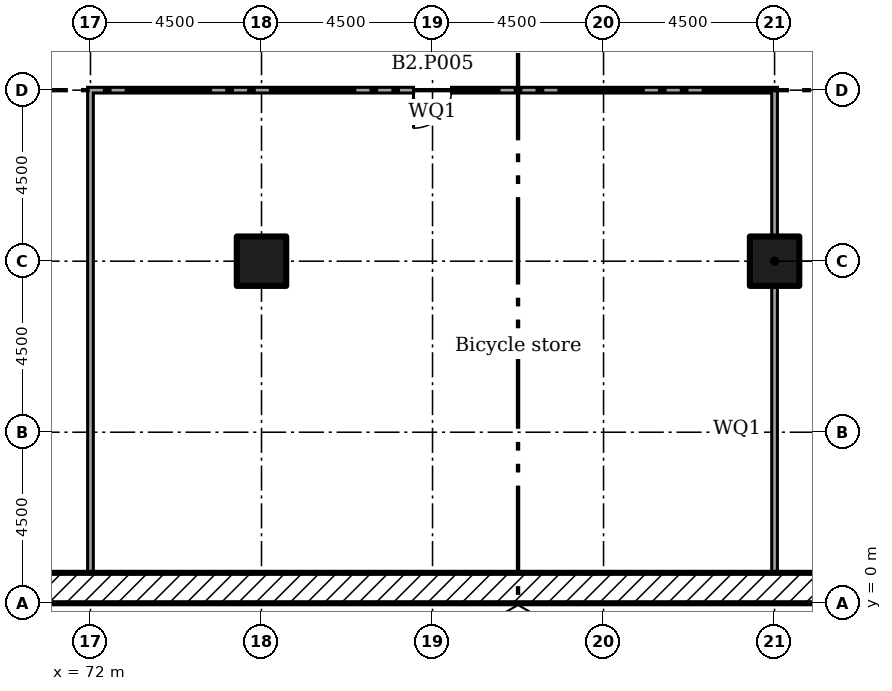
"""IFC4 building model, lengths in metres.
Left out: names, types, materials, properties, quantities, classifications, styles, units other than length and angle.
Written with IfcOpenShell. Run it as: python <this file> out.ifc"""

import sys

from ifc_helpers import new_model, si_unit, direction, frame, frame_2d, origin, origin_2d, place, context, subcontext, project, spatial, rectangle, extrude, element, fill, save


model = new_model("IFC4")
c1 = context("Model", 3, precision=1e-05, world=origin(), true_north=direction((0.0, 1.0)))
c2 = subcontext(c1, "Body", "Model", "MODEL_VIEW")
j1 = project(units=[si_unit("LENGTHUNIT", "METRE"), si_unit("PLANEANGLEUNIT", "RADIAN")], contexts=[c1])
p1 = place(None, origin())
s1 = spatial("IfcSite", under=j1, at=p1, CompositionType="ELEMENT")
p2 = place(p1, origin())
s2 = spatial("IfcBuilding", under=s1, at=p2, CompositionType="ELEMENT")
p3 = place(p2, frame((0.0, 0.0, -8.0)))
s3 = spatial("IfcBuildingStorey", under=s2, at=p3, CompositionType="ELEMENT", Elevation=-8.0)
for number, where in (
    (1, (76.5, 9.0, 0.0)),
    (2, (90.0, 9.0, 0.0)),
):
    element("IfcColumn", number, at=place(p3, frame(where)), inside=s3, PredefinedType="COLUMN", context=c2, shape_type="SweptSolid", body=[
        extrude(rectangle(XDim=1.3, YDim=1.3, at=origin_2d()), origin(), (0.0, 0.0, 1.0), 4.0),
    ])
p4 = place(p3, frame((0.0, 0.4, 0.0)))
e3 = element("IfcWall", 3, at=p4, inside=s3, PredefinedType="SOLIDWALL", context=c2, shape_type="SweptSolid", body=[
    extrude(rectangle(XDim=153.0, YDim=0.8, at=frame_2d((76.5, 0.0))), origin(), (0.0, 0.0, 1.0), 4.0),
])
p5 = place(p3, frame((72.0, 0.8, 0.0), z_axis=(0.0, 0.0, 1.0), x_axis=(0.0, 1.0, 0.0)))
e4 = element("IfcWall", 4, at=p5, inside=s3, PredefinedType="PARTITIONING", context=c2, shape_type="SweptSolid", body=[
    extrude(rectangle(XDim=12.775, YDim=0.15, at=frame_2d((6.387, 0.0))), origin(), (0.0, 0.0, 1.0), 3.55),
])
p6 = place(p3, frame((90.0, 0.8, 0.0), z_axis=(0.0, 0.0, 1.0), x_axis=(0.0, 1.0, 0.0)))
e5 = element("IfcWall", 5, at=p6, inside=s3, PredefinedType="PARTITIONING", context=c2, shape_type="SweptSolid", body=[
    extrude(rectangle(XDim=7.555, YDim=0.15, at=frame_2d((3.777, 0.0))), origin(), (0.0, 0.0, 1.0), 3.55),
])
p7 = place(p3, frame((90.0, 9.645, 0.0), z_axis=(0.0, 0.0, 1.0), x_axis=(0.0, 1.0, 0.0)))
e6 = element("IfcWall", 6, at=p7, inside=s3, PredefinedType="PARTITIONING", context=c2, shape_type="SweptSolid", body=[
    extrude(rectangle(XDim=3.93, YDim=0.15, at=frame_2d((1.965, 0.0))), origin(), (0.0, 0.0, 1.0), 3.55),
])
p8 = place(p3, frame((72.075, 13.5, 0.0)))
e7 = element("IfcWall", 7, at=p8, inside=s3, PredefinedType="PARTITIONING", context=c2, shape_type="SweptSolid", body=[
    extrude(rectangle(XDim=17.85, YDim=0.15, at=frame_2d((8.925, 0.0))), origin(), (0.0, 0.0, 1.0), 3.55),
])
p9 = place(p8, frame((8.425, 0.0, 0.0)))
e8 = element("IfcOpeningElement", 8, at=p9, cuts=e7, PredefinedType="OPENING", context=c2, shape_type="SweptSolid", body=[
    extrude(rectangle(XDim=1.0, YDim=2.1, at=frame_2d((0.5, 1.05))), frame((0.0, 0.085, 0.0), z_axis=(0.0, -1.0, 0.0), x_axis=(1.0, 0.0, 0.0)), (0.0, 0.0, 1.0), 0.17),
])
p10 = place(p9, frame((1.0, 0.0, 0.0), x_axis=(-1.0, 0.0, 0.0)))
e9 = element("IfcDoor", 9, at=p10, inside=s3, OperationType="SINGLE_SWING_LEFT", PredefinedType="DOOR", context=c2, shape_type="SweptSolid", body=[
    extrude(rectangle(XDim=1.0, YDim=2.1, at=frame_2d((0.5, 1.05))), frame((0.0, 0.025, 0.0), z_axis=(0.0, -1.0, 0.0), x_axis=(1.0, 0.0, 0.0)), (0.0, 0.0, 1.0), 0.05),
])
fill(e8, e9)
save(model, sys.argv[1])
